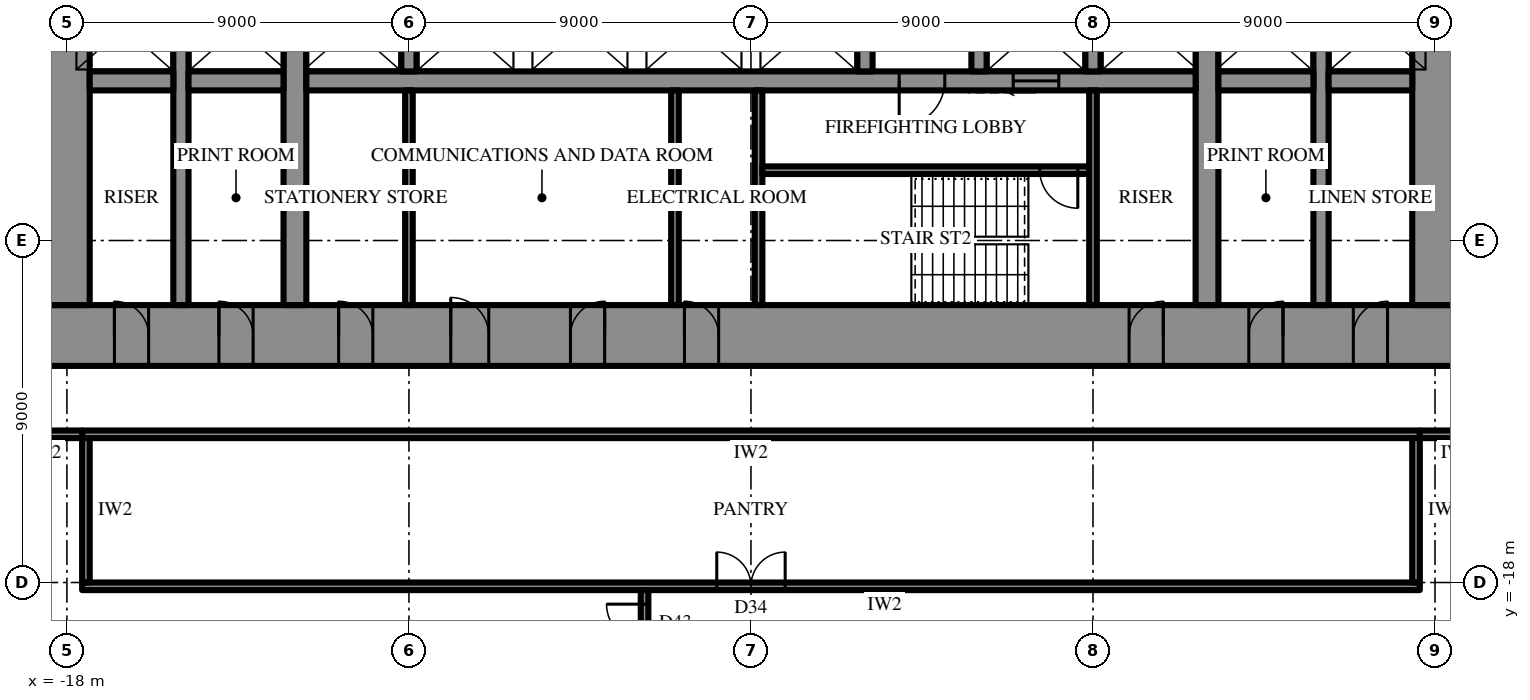
"""IFC4 building model, lengths in metres.
Left out: names, types, materials, properties, quantities, classifications, styles, units other than length and angle.
Written with IfcOpenShell. Run it as: python <this file> out.ifc"""

import sys

from ifc_helpers import new_model, si_unit, direction, frame, frame_2d, origin, place, context, subcontext, project, spatial, rectangle, extrude, element, fill, save


model = new_model("IFC4")
c1 = context("Model", 3, precision=1e-05, world=origin(), true_north=direction((0.0, 1.0)))
c2 = subcontext(c1, "Body", "Model", "MODEL_VIEW")
j1 = project(units=[si_unit("LENGTHUNIT", "METRE"), si_unit("PLANEANGLEUNIT", "RADIAN")], contexts=[c1])
p1 = place(None, origin())
s1 = spatial("IfcSite", under=j1, at=p1, CompositionType="ELEMENT")
p2 = place(p1, origin())
s2 = spatial("IfcBuilding", under=s1, at=p2, CompositionType="ELEMENT")
p3 = place(p2, frame((0.0, 0.0, 103.3)))
s3 = spatial("IfcBuildingStorey", under=s2, at=p3, CompositionType="ELEMENT", Elevation=103.3)
p4 = place(p3, frame((18.6, -11.5, 0.0), z_axis=(0.0, 0.0, 1.0), x_axis=(-1.0, 0.0, 0.0)))
e1 = element("IfcWall", 1, at=p4, inside=s3, PredefinedType="SHEAR", context=c2, shape_type="SweptSolid", body=[
    extrude(rectangle(XDim=37.2, YDim=1.6, at=frame_2d((18.6, 0.0))), origin(), (0.0, 0.0, 1.0), 4.2),
])
p5 = place(p4, frame((19.45, 0.0, 0.0)))
e2 = element("IfcOpeningElement", 2, at=p5, cuts=e1, PredefinedType="OPENING", context=c2, shape_type="SweptSolid", body=[
    extrude(rectangle(XDim=0.9, YDim=2.2, at=frame_2d((0.45, 1.1))), frame((0.0, 0.81, 0.0), z_axis=(0.0, -1.0, 0.0), x_axis=(1.0, 0.0, 0.0)), (0.0, 0.0, 1.0), 1.62),
])
p6 = place(p4, frame((22.45, 0.0, 0.0)))
e3 = element("IfcOpeningElement", 3, at=p6, cuts=e1, PredefinedType="OPENING", context=c2, shape_type="SweptSolid", body=[
    extrude(rectangle(XDim=0.9, YDim=2.2, at=frame_2d((0.45, 1.1))), frame((0.0, 0.81, 0.0), z_axis=(0.0, -1.0, 0.0), x_axis=(1.0, 0.0, 0.0)), (0.0, 0.0, 1.0), 1.62),
])
p7 = place(p4, frame((25.5, 0.0, 0.0)))
e4 = element("IfcOpeningElement", 4, at=p7, cuts=e1, PredefinedType="OPENING", context=c2, shape_type="SweptSolid", body=[
    extrude(rectangle(XDim=1.0, YDim=2.2, at=frame_2d((0.5, 1.1))), frame((0.0, 0.81, 0.0), z_axis=(0.0, -1.0, 0.0), x_axis=(1.0, 0.0, 0.0)), (0.0, 0.0, 1.0), 1.62),
])
p8 = place(p4, frame((1.85, 0.0, 0.0)))
e5 = element("IfcOpeningElement", 5, at=p8, cuts=e1, PredefinedType="OPENING", context=c2, shape_type="SweptSolid", body=[
    extrude(rectangle(XDim=0.9, YDim=2.2, at=frame_2d((0.45, 1.1))), frame((0.0, 0.81, 0.0), z_axis=(0.0, -1.0, 0.0), x_axis=(1.0, 0.0, 0.0)), (0.0, 0.0, 1.0), 1.62),
])
p9 = place(p4, frame((4.6, 0.0, 0.0)))
e6 = element("IfcOpeningElement", 6, at=p9, cuts=e1, PredefinedType="OPENING", context=c2, shape_type="SweptSolid", body=[
    extrude(rectangle(XDim=0.9, YDim=2.2, at=frame_2d((0.45, 1.1))), frame((0.0, 0.81, 0.0), z_axis=(0.0, -1.0, 0.0), x_axis=(1.0, 0.0, 0.0)), (0.0, 0.0, 1.0), 1.62),
])
p10 = place(p4, frame((7.75, 0.0, 0.0)))
e7 = element("IfcOpeningElement", 7, at=p10, cuts=e1, PredefinedType="OPENING", context=c2, shape_type="SweptSolid", body=[
    extrude(rectangle(XDim=0.9, YDim=2.2, at=frame_2d((0.45, 1.1))), frame((0.0, 0.81, 0.0), z_axis=(0.0, -1.0, 0.0), x_axis=(1.0, 0.0, 0.0)), (0.0, 0.0, 1.0), 1.62),
])
p11 = place(p4, frame((28.55, 0.0, 0.0)))
e8 = element("IfcOpeningElement", 8, at=p11, cuts=e1, PredefinedType="OPENING", context=c2, shape_type="SweptSolid", body=[
    extrude(rectangle(XDim=0.9, YDim=2.2, at=frame_2d((0.45, 1.1))), frame((0.0, 0.81, 0.0), z_axis=(0.0, -1.0, 0.0), x_axis=(1.0, 0.0, 0.0)), (0.0, 0.0, 1.0), 1.62),
])
p12 = place(p4, frame((31.7, 0.0, 0.0)))
e9 = element("IfcOpeningElement", 9, at=p12, cuts=e1, PredefinedType="OPENING", context=c2, shape_type="SweptSolid", body=[
    extrude(rectangle(XDim=0.9, YDim=2.2, at=frame_2d((0.45, 1.1))), frame((0.0, 0.81, 0.0), z_axis=(0.0, -1.0, 0.0), x_axis=(1.0, 0.0, 0.0)), (0.0, 0.0, 1.0), 1.62),
])
p13 = place(p4, frame((34.45, 0.0, 0.0)))
e10 = element("IfcOpeningElement", 10, at=p13, cuts=e1, PredefinedType="OPENING", context=c2, shape_type="SweptSolid", body=[
    extrude(rectangle(XDim=0.9, YDim=2.2, at=frame_2d((0.45, 1.1))), frame((0.0, 0.81, 0.0), z_axis=(0.0, -1.0, 0.0), x_axis=(1.0, 0.0, 0.0)), (0.0, 0.0, 1.0), 1.62),
])
p14 = place(p3, frame((18.0, -10.7, 0.0), z_axis=(0.0, 0.0, 1.0), x_axis=(0.0, 1.0, 0.0)))
e11 = element("IfcWall", 11, at=p14, inside=s3, PredefinedType="SHEAR", context=c2, shape_type="SweptSolid", body=[
    extrude(rectangle(XDim=21.4, YDim=1.2, at=frame_2d((10.7, 0.0))), origin(), (0.0, 0.0, 1.0), 4.2),
])
p15 = place(p14, frame((9.8, 0.0, 0.0)))
e12 = element("IfcOpeningElement", 12, at=p15, cuts=e11, PredefinedType="OPENING", context=c2, shape_type="SweptSolid", body=[
    extrude(rectangle(XDim=1.8, YDim=2.4, at=frame_2d((0.9, 1.2))), frame((0.0, 0.61, 0.0), z_axis=(0.0, -1.0, 0.0), x_axis=(1.0, 0.0, 0.0)), (0.0, 0.0, 1.0), 1.22),
])
p16 = place(p3, frame((-18.0, 10.7, 0.0), z_axis=(0.0, 0.0, 1.0), x_axis=(0.0, -1.0, 0.0)))
e13 = element("IfcWall", 13, at=p16, inside=s3, PredefinedType="SHEAR", context=c2, shape_type="SweptSolid", body=[
    extrude(rectangle(XDim=21.4, YDim=1.2, at=frame_2d((10.7, 0.0))), origin(), (0.0, 0.0, 1.0), 4.2),
])
p17 = place(p16, frame((9.8, 0.0, 0.0)))
e14 = element("IfcOpeningElement", 14, at=p17, cuts=e13, PredefinedType="OPENING", context=c2, shape_type="SweptSolid", body=[
    extrude(rectangle(XDim=1.8, YDim=2.4, at=frame_2d((0.9, 1.2))), frame((0.0, 0.61, 0.0), z_axis=(0.0, -1.0, 0.0), x_axis=(1.0, 0.0, 0.0)), (0.0, 0.0, 1.0), 1.22),
])
p18 = place(p3, frame((12.0, -10.7, 0.0), z_axis=(0.0, 0.0, 1.0), x_axis=(0.0, 1.0, 0.0)))
e15 = element("IfcWall", 15, at=p18, inside=s3, PredefinedType="SHEAR", context=c2, shape_type="SweptSolid", body=[
    extrude(rectangle(XDim=21.4, YDim=0.6, at=frame_2d((10.7, 0.0))), origin(), (0.0, 0.0, 1.0), 4.2),
])
p19 = place(p18, frame((9.8, 0.0, 0.0)))
e16 = element("IfcOpeningElement", 16, at=p19, cuts=e15, PredefinedType="OPENING", context=c2, shape_type="SweptSolid", body=[
    extrude(rectangle(XDim=1.8, YDim=2.4, at=frame_2d((0.9, 1.2))), frame((0.0, 0.31, 0.0), z_axis=(0.0, -1.0, 0.0), x_axis=(1.0, 0.0, 0.0)), (0.0, 0.0, 1.0), 0.62),
])
p20 = place(p3, frame((-12.0, -10.7, 0.0), z_axis=(0.0, 0.0, 1.0), x_axis=(0.0, 1.0, 0.0)))
e17 = element("IfcWall", 17, at=p20, inside=s3, PredefinedType="SHEAR", context=c2, shape_type="SweptSolid", body=[
    extrude(rectangle(XDim=21.4, YDim=0.6, at=frame_2d((10.7, 0.0))), origin(), (0.0, 0.0, 1.0), 4.2),
])
p21 = place(p20, frame((9.8, 0.0, 0.0)))
e18 = element("IfcOpeningElement", 18, at=p21, cuts=e17, PredefinedType="OPENING", context=c2, shape_type="SweptSolid", body=[
    extrude(rectangle(XDim=1.8, YDim=2.4, at=frame_2d((0.9, 1.2))), frame((0.0, 0.31, 0.0), z_axis=(0.0, -1.0, 0.0), x_axis=(1.0, 0.0, 0.0)), (0.0, 0.0, 1.0), 0.62),
])
p22 = place(p3, frame((15.0, -10.7, 0.0), z_axis=(0.0, 0.0, 1.0), x_axis=(0.0, 1.0, 0.0)))
e19 = element("IfcWall", 19, at=p22, inside=s3, PredefinedType="SHEAR", context=c2, shape_type="SweptSolid", body=[
    extrude(rectangle(XDim=21.4, YDim=0.4, at=frame_2d((10.7, 0.0))), origin(), (0.0, 0.0, 1.0), 4.2),
])
p23 = place(p22, frame((9.8, 0.0, 0.0)))
e20 = element("IfcOpeningElement", 20, at=p23, cuts=e19, PredefinedType="OPENING", context=c2, shape_type="SweptSolid", body=[
    extrude(rectangle(XDim=1.8, YDim=2.4, at=frame_2d((0.9, 1.2))), frame((0.0, 0.21, 0.0), z_axis=(0.0, -1.0, 0.0), x_axis=(1.0, 0.0, 0.0)), (0.0, 0.0, 1.0), 0.42),
])
p24 = place(p3, frame((-15.0, -10.7, 0.0), z_axis=(0.0, 0.0, 1.0), x_axis=(0.0, 1.0, 0.0)))
e21 = element("IfcWall", 21, at=p24, inside=s3, PredefinedType="SHEAR", context=c2, shape_type="SweptSolid", body=[
    extrude(rectangle(XDim=21.4, YDim=0.4, at=frame_2d((10.7, 0.0))), origin(), (0.0, 0.0, 1.0), 4.2),
])
p25 = place(p24, frame((9.8, 0.0, 0.0)))
e22 = element("IfcOpeningElement", 22, at=p25, cuts=e21, PredefinedType="OPENING", context=c2, shape_type="SweptSolid", body=[
    extrude(rectangle(XDim=1.8, YDim=2.4, at=frame_2d((0.9, 1.2))), frame((0.0, 0.21, 0.0), z_axis=(0.0, -1.0, 0.0), x_axis=(1.0, 0.0, 0.0)), (0.0, 0.0, 1.0), 0.42),
])
p26 = place(p3, frame((17.4, -4.8, 0.0), z_axis=(0.0, 0.0, 1.0), x_axis=(-1.0, 0.0, 0.0)))
e23 = element("IfcWall", 23, at=p26, inside=s3, PredefinedType="SHEAR", context=c2, shape_type="SweptSolid", body=[
    extrude(rectangle(XDim=2.2, YDim=0.5, at=frame_2d((1.1, 0.0))), origin(), (0.0, 0.0, 1.0), 4.2),
])
p27 = place(p3, frame((14.8, -4.8, 0.0), z_axis=(0.0, 0.0, 1.0), x_axis=(-1.0, 0.0, 0.0)))
e24 = element("IfcWall", 24, at=p27, inside=s3, PredefinedType="SHEAR", context=c2, shape_type="SweptSolid", body=[
    extrude(rectangle(XDim=2.5, YDim=0.5, at=frame_2d((1.25, 0.0))), origin(), (0.0, 0.0, 1.0), 4.2),
])
p28 = place(p3, frame((11.7, -4.8, 0.0), z_axis=(0.0, 0.0, 1.0), x_axis=(-1.0, 0.0, 0.0)))
e25 = element("IfcWall", 25, at=p28, inside=s3, PredefinedType="SHEAR", context=c2, shape_type="SweptSolid", body=[
    extrude(rectangle(XDim=23.4, YDim=0.5, at=frame_2d((11.7, 0.0))), origin(), (0.0, 0.0, 1.0), 4.2),
])
p29 = place(p28, frame((6.6, 0.0, 0.0)))
e26 = element("IfcOpeningElement", 26, at=p29, cuts=e25, PredefinedType="OPENING", context=c2, shape_type="SweptSolid", body=[
    extrude(rectangle(XDim=1.2, YDim=2.2, at=frame_2d((0.6, 1.1))), frame((0.0, 0.26, 0.0), z_axis=(0.0, -1.0, 0.0), x_axis=(1.0, 0.0, 0.0)), (0.0, 0.0, 1.0), 0.52),
])
p30 = place(p28, frame((3.6, 0.0, 0.0)))
e27 = element("IfcOpeningElement", 27, at=p30, cuts=e25, PredefinedType="OPENING", context=c2, shape_type="SweptSolid", body=[
    extrude(rectangle(XDim=1.2, YDim=2.2, at=frame_2d((0.6, 1.1))), frame((0.0, 0.26, 0.0), z_axis=(0.0, -1.0, 0.0), x_axis=(1.0, 0.0, 0.0)), (0.0, 0.0, 1.0), 0.52),
])
p31 = place(p3, frame((-12.3, -4.8, 0.0), z_axis=(0.0, 0.0, 1.0), x_axis=(-1.0, 0.0, 0.0)))
e28 = element("IfcWall", 28, at=p31, inside=s3, PredefinedType="SHEAR", context=c2, shape_type="SweptSolid", body=[
    extrude(rectangle(XDim=2.5, YDim=0.5, at=frame_2d((1.25, 0.0))), origin(), (0.0, 0.0, 1.0), 4.2),
])
p32 = place(p3, frame((-15.2, -4.8, 0.0), z_axis=(0.0, 0.0, 1.0), x_axis=(-1.0, 0.0, 0.0)))
e29 = element("IfcWall", 29, at=p32, inside=s3, PredefinedType="SHEAR", context=c2, shape_type="SweptSolid", body=[
    extrude(rectangle(XDim=2.2, YDim=0.5, at=frame_2d((1.1, 0.0))), origin(), (0.0, 0.0, 1.0), 4.2),
])
for number, where, z_axis, x_axis in (
    (30, (9.0, -2.25, 0.0), (0.0, 0.0, 1.0), (0.0, -1.0, 0.0)),
    (31, (6.0, -2.25, 0.0), (0.0, 0.0, 1.0), (0.0, -1.0, 0.0)),
    (32, (3.0, -2.25, 0.0), (0.0, 0.0, 1.0), (0.0, -1.0, 0.0)),
    (33, (-9.0, -2.25, 0.0), (0.0, 0.0, 1.0), (0.0, -1.0, 0.0)),
):
    element("IfcWall", number, at=place(p3, frame(where, z_axis=z_axis, x_axis=x_axis)), inside=s3, PredefinedType="SHEAR", context=c2, shape_type="SweptSolid", body=[
        extrude(rectangle(XDim=2.3, YDim=0.4, at=frame_2d((1.15, 0.0))), origin(), (0.0, 0.0, 1.0), 4.2),
    ])
p33 = place(p3, frame((0.2, -5.05, 0.0), z_axis=(0.0, 0.0, 1.0), x_axis=(0.0, -1.0, 0.0)))
e34 = element("IfcWall", 34, at=p33, inside=s3, PredefinedType="SHEAR", context=c2, shape_type="SweptSolid", body=[
    extrude(rectangle(XDim=5.65, YDim=0.2, at=frame_2d((2.825, 0.0))), origin(), (0.0, 0.0, 1.0), 4.2),
])
p34 = place(p3, frame((8.9, -7.15, 0.0), z_axis=(0.0, 0.0, 1.0), x_axis=(-1.0, 0.0, 0.0)))
e35 = element("IfcWall", 35, at=p34, inside=s3, PredefinedType="SHEAR", context=c2, shape_type="SweptSolid", body=[
    extrude(rectangle(XDim=8.6, YDim=0.2, at=frame_2d((4.3, 0.0))), origin(), (0.0, 0.0, 1.0), 4.2),
])
p35 = place(p34, frame((0.3, 0.0, 0.0)))
e36 = element("IfcOpeningElement", 36, at=p35, cuts=e35, PredefinedType="OPENING", context=c2, shape_type="SweptSolid", body=[
    extrude(rectangle(XDim=1.0, YDim=2.2, at=frame_2d((0.5, 1.1))), frame((0.0, 0.11, 0.0), z_axis=(0.0, -1.0, 0.0), x_axis=(1.0, 0.0, 0.0)), (0.0, 0.0, 1.0), 0.22),
])
for number, where, z_axis, x_axis in (
    (37, (9.0, -5.05, 0.0), (0.0, 0.0, 1.0), (0.0, -1.0, 0.0)),
    (38, (-9.0, -5.05, 0.0), (0.0, 0.0, 1.0), (0.0, -1.0, 0.0)),
    (39, (-2.0, -5.05, 0.0), (0.0, 0.0, 1.0), (0.0, -1.0, 0.0)),
):
    element("IfcWall", number, at=place(p3, frame(where, z_axis=z_axis, x_axis=x_axis)), inside=s3, PredefinedType="PARTITIONING", context=c2, shape_type="SweptSolid", body=[
        extrude(rectangle(XDim=5.65, YDim=0.2, at=frame_2d((2.825, 0.0))), origin(), (0.0, 0.0, 1.0), 3.9),
    ])
p36 = place(p3, frame((17.6, -14.1, 0.0), z_axis=(0.0, 0.0, 1.0), x_axis=(-1.0, 0.0, 0.0)))
e40 = element("IfcWall", 40, at=p36, inside=s3, PredefinedType="PARTITIONING", context=c2, shape_type="SweptSolid", body=[
    extrude(rectangle(XDim=35.2, YDim=0.2, at=frame_2d((17.6, 0.0))), origin(), (0.0, 0.0, 1.0), 3.9),
])
p37 = place(p3, frame((17.6, -18.1, 0.0), z_axis=(0.0, 0.0, 1.0), x_axis=(-1.0, 0.0, 0.0)))
e41 = element("IfcWall", 41, at=p37, inside=s3, PredefinedType="PARTITIONING", context=c2, shape_type="SweptSolid", body=[
    extrude(rectangle(XDim=35.2, YDim=0.2, at=frame_2d((17.6, 0.0))), origin(), (0.0, 0.0, 1.0), 3.9),
])
p38 = place(p37, frame((16.7, 0.0, 0.0)))
e42 = element("IfcOpeningElement", 42, at=p38, cuts=e41, PredefinedType="OPENING", context=c2, shape_type="SweptSolid", body=[
    extrude(rectangle(XDim=1.8, YDim=2.4, at=frame_2d((0.9, 1.2))), frame((0.0, 0.11, 0.0), z_axis=(0.0, -1.0, 0.0), x_axis=(1.0, 0.0, 0.0)), (0.0, 0.0, 1.0), 0.22),
])
for number, where, z_axis, x_axis in (
    (43, (17.5, -14.2, 0.0), (0.0, 0.0, 1.0), (0.0, -1.0, 0.0)),
    (44, (-17.5, -14.2, 0.0), (0.0, 0.0, 1.0), (0.0, -1.0, 0.0)),
):
    element("IfcWall", number, at=place(p3, frame(where, z_axis=z_axis, x_axis=x_axis)), inside=s3, PredefinedType="PARTITIONING", context=c2, shape_type="SweptSolid", body=[
        extrude(rectangle(XDim=3.8, YDim=0.2, at=frame_2d((1.9, 0.0))), origin(), (0.0, 0.0, 1.0), 3.9),
    ])
for number, where, z_axis, x_axis in (
    (45, (-17.6, -14.1, 0.0), (0.0, 0.0, 1.0), (-1.0, 0.0, 0.0)),
    (46, (19.6, -14.1, 0.0), (0.0, 0.0, 1.0), (-1.0, 0.0, 0.0)),
):
    element("IfcWall", number, at=place(p3, frame(where, z_axis=z_axis, x_axis=x_axis)), inside=s3, PredefinedType="PARTITIONING", context=c2, shape_type="SweptSolid", body=[
        extrude(rectangle(XDim=2.0, YDim=0.2, at=frame_2d((1.0, 0.0))), origin(), (0.0, 0.0, 1.0), 3.9),
    ])
p39 = place(p3, frame((-2.8, -18.2, 0.0), z_axis=(0.0, 0.0, 1.0), x_axis=(0.0, -1.0, 0.0)))
e47 = element("IfcWall", 47, at=p39, inside=s3, PredefinedType="PARTITIONING", context=c2, shape_type="SweptSolid", body=[
    extrude(rectangle(XDim=8.7, YDim=0.2, at=frame_2d((4.35, 0.0))), origin(), (0.0, 0.0, 1.0), 2.844),
])
p40 = place(p39, frame((0.37, 0.0, 0.0)))
e48 = element("IfcOpeningElement", 48, at=p40, cuts=e47, PredefinedType="OPENING", context=c2, shape_type="SweptSolid", body=[
    extrude(rectangle(XDim=1.0, YDim=2.2, at=frame_2d((0.5, 1.1))), frame((0.0, 0.11, 0.0), z_axis=(0.0, -1.0, 0.0), x_axis=(1.0, 0.0, 0.0)), (0.0, 0.0, 1.0), 0.22),
])
p41 = place(p29, origin())
e49 = element("IfcDoor", 49, at=p41, inside=s3, OperationType="SINGLE_SWING_LEFT", PredefinedType="DOOR", context=c2, shape_type="SweptSolid", body=[
    extrude(rectangle(XDim=1.2, YDim=2.2, at=frame_2d((0.6, 1.1))), frame((0.0, 0.025, 0.0), z_axis=(0.0, -1.0, 0.0), x_axis=(1.0, 0.0, 0.0)), (0.0, 0.0, 1.0), 0.05),
])
fill(e26, e49)
p42 = place(p35, origin())
e50 = element("IfcDoor", 50, at=p42, inside=s3, OperationType="SINGLE_SWING_RIGHT", PredefinedType="DOOR", context=c2, shape_type="SweptSolid", body=[
    extrude(rectangle(XDim=1.0, YDim=2.2, at=frame_2d((0.5, 1.1))), frame((0.0, 0.025, 0.0), z_axis=(0.0, -1.0, 0.0), x_axis=(1.0, 0.0, 0.0)), (0.0, 0.0, 1.0), 0.05),
])
fill(e36, e50)
p43 = place(p5, frame((0.9, 0.0, 0.0), z_axis=(0.0, 0.0, 1.0), x_axis=(-1.0, 0.0, 0.0)))
e51 = element("IfcDoor", 51, at=p43, inside=s3, OperationType="SINGLE_SWING_RIGHT", PredefinedType="DOOR", context=c2, shape_type="SweptSolid", body=[
    extrude(rectangle(XDim=0.9, YDim=2.2, at=frame_2d((0.45, 1.1))), frame((0.0, 0.025, 0.0), z_axis=(0.0, -1.0, 0.0), x_axis=(1.0, 0.0, 0.0)), (0.0, 0.0, 1.0), 0.05),
])
fill(e2, e51)
p44 = place(p6, frame((0.9, 0.0, 0.0), z_axis=(0.0, 0.0, 1.0), x_axis=(-1.0, 0.0, 0.0)))
e52 = element("IfcDoor", 52, at=p44, inside=s3, OperationType="SINGLE_SWING_LEFT", PredefinedType="DOOR", context=c2, shape_type="SweptSolid", body=[
    extrude(rectangle(XDim=0.9, YDim=2.2, at=frame_2d((0.45, 1.1))), frame((0.0, 0.025, 0.0), z_axis=(0.0, -1.0, 0.0), x_axis=(1.0, 0.0, 0.0)), (0.0, 0.0, 1.0), 0.05),
])
fill(e3, e52)
p45 = place(p7, frame((1.0, 0.0, 0.0), z_axis=(0.0, 0.0, 1.0), x_axis=(-1.0, 0.0, 0.0)))
e53 = element("IfcDoor", 53, at=p45, inside=s3, OperationType="SINGLE_SWING_RIGHT", PredefinedType="DOOR", context=c2, shape_type="SweptSolid", body=[
    extrude(rectangle(XDim=1.0, YDim=2.2, at=frame_2d((0.5, 1.1))), frame((0.0, 0.025, 0.0), z_axis=(0.0, -1.0, 0.0), x_axis=(1.0, 0.0, 0.0)), (0.0, 0.0, 1.0), 0.05),
])
fill(e4, e53)
p46 = place(p8, frame((0.9, 0.0, 0.0), z_axis=(0.0, 0.0, 1.0), x_axis=(-1.0, 0.0, 0.0)))
e54 = element("IfcDoor", 54, at=p46, inside=s3, OperationType="SINGLE_SWING_LEFT", PredefinedType="DOOR", context=c2, shape_type="SweptSolid", body=[
    extrude(rectangle(XDim=0.9, YDim=2.2, at=frame_2d((0.45, 1.1))), frame((0.0, 0.025, 0.0), z_axis=(0.0, -1.0, 0.0), x_axis=(1.0, 0.0, 0.0)), (0.0, 0.0, 1.0), 0.05),
])
fill(e5, e54)
p47 = place(p9, frame((0.9, 0.0, 0.0), z_axis=(0.0, 0.0, 1.0), x_axis=(-1.0, 0.0, 0.0)))
e55 = element("IfcDoor", 55, at=p47, inside=s3, OperationType="SINGLE_SWING_LEFT", PredefinedType="DOOR", context=c2, shape_type="SweptSolid", body=[
    extrude(rectangle(XDim=0.9, YDim=2.2, at=frame_2d((0.45, 1.1))), frame((0.0, 0.025, 0.0), z_axis=(0.0, -1.0, 0.0), x_axis=(1.0, 0.0, 0.0)), (0.0, 0.0, 1.0), 0.05),
])
fill(e6, e55)
p48 = place(p10, frame((0.9, 0.0, 0.0), z_axis=(0.0, 0.0, 1.0), x_axis=(-1.0, 0.0, 0.0)))
e56 = element("IfcDoor", 56, at=p48, inside=s3, OperationType="SINGLE_SWING_LEFT", PredefinedType="DOOR", context=c2, shape_type="SweptSolid", body=[
    extrude(rectangle(XDim=0.9, YDim=2.2, at=frame_2d((0.45, 1.1))), frame((0.0, 0.025, 0.0), z_axis=(0.0, -1.0, 0.0), x_axis=(1.0, 0.0, 0.0)), (0.0, 0.0, 1.0), 0.05),
])
fill(e7, e56)
p49 = place(p11, frame((0.9, 0.0, 0.0), z_axis=(0.0, 0.0, 1.0), x_axis=(-1.0, 0.0, 0.0)))
e57 = element("IfcDoor", 57, at=p49, inside=s3, OperationType="SINGLE_SWING_RIGHT", PredefinedType="DOOR", context=c2, shape_type="SweptSolid", body=[
    extrude(rectangle(XDim=0.9, YDim=2.2, at=frame_2d((0.45, 1.1))), frame((0.0, 0.025, 0.0), z_axis=(0.0, -1.0, 0.0), x_axis=(1.0, 0.0, 0.0)), (0.0, 0.0, 1.0), 0.05),
])
fill(e8, e57)
p50 = place(p12, frame((0.9, 0.0, 0.0), z_axis=(0.0, 0.0, 1.0), x_axis=(-1.0, 0.0, 0.0)))
e58 = element("IfcDoor", 58, at=p50, inside=s3, OperationType="SINGLE_SWING_RIGHT", PredefinedType="DOOR", context=c2, shape_type="SweptSolid", body=[
    extrude(rectangle(XDim=0.9, YDim=2.2, at=frame_2d((0.45, 1.1))), frame((0.0, 0.025, 0.0), z_axis=(0.0, -1.0, 0.0), x_axis=(1.0, 0.0, 0.0)), (0.0, 0.0, 1.0), 0.05),
])
fill(e9, e58)
p51 = place(p13, frame((0.9, 0.0, 0.0), z_axis=(0.0, 0.0, 1.0), x_axis=(-1.0, 0.0, 0.0)))
e59 = element("IfcDoor", 59, at=p51, inside=s3, OperationType="SINGLE_SWING_RIGHT", PredefinedType="DOOR", context=c2, shape_type="SweptSolid", body=[
    extrude(rectangle(XDim=0.9, YDim=2.2, at=frame_2d((0.45, 1.1))), frame((0.0, 0.025, 0.0), z_axis=(0.0, -1.0, 0.0), x_axis=(1.0, 0.0, 0.0)), (0.0, 0.0, 1.0), 0.05),
])
fill(e10, e59)
p52 = place(p30, origin())
e60 = element("IfcDoor", 60, at=p52, inside=s3, OperationType="SLIDING_TO_LEFT", PredefinedType="DOOR", context=c2, shape_type="SweptSolid", body=[
    extrude(rectangle(XDim=1.2, YDim=2.2, at=frame_2d((0.6, 1.1))), frame((0.0, 0.025, 0.0), z_axis=(0.0, -1.0, 0.0), x_axis=(1.0, 0.0, 0.0)), (0.0, 0.0, 1.0), 0.05),
])
fill(e27, e60)
p53 = place(p38, frame((1.8, 0.0, 0.0), z_axis=(0.0, 0.0, 1.0), x_axis=(-1.0, 0.0, 0.0)))
e61 = element("IfcDoor", 61, at=p53, inside=s3, OperationType="DOUBLE_DOOR_SINGLE_SWING", PredefinedType="DOOR", context=c2, shape_type="SweptSolid", body=[
    extrude(rectangle(XDim=1.8, YDim=2.4, at=frame_2d((0.9, 1.2))), frame((0.0, 0.025, 0.0), z_axis=(0.0, -1.0, 0.0), x_axis=(1.0, 0.0, 0.0)), (0.0, 0.0, 1.0), 0.05),
])
fill(e42, e61)
p54 = place(p40, frame((1.0, 0.0, 0.0), z_axis=(0.0, 0.0, 1.0), x_axis=(-1.0, 0.0, 0.0)))
e62 = element("IfcDoor", 62, at=p54, inside=s3, OperationType="SINGLE_SWING_LEFT", PredefinedType="DOOR", context=c2, shape_type="SweptSolid", body=[
    extrude(rectangle(XDim=1.0, YDim=2.2, at=frame_2d((0.5, 1.1))), frame((0.0, 0.025, 0.0), z_axis=(0.0, -1.0, 0.0), x_axis=(1.0, 0.0, 0.0)), (0.0, 0.0, 1.0), 0.05),
])
fill(e48, e62)
save(model, sys.argv[1])
